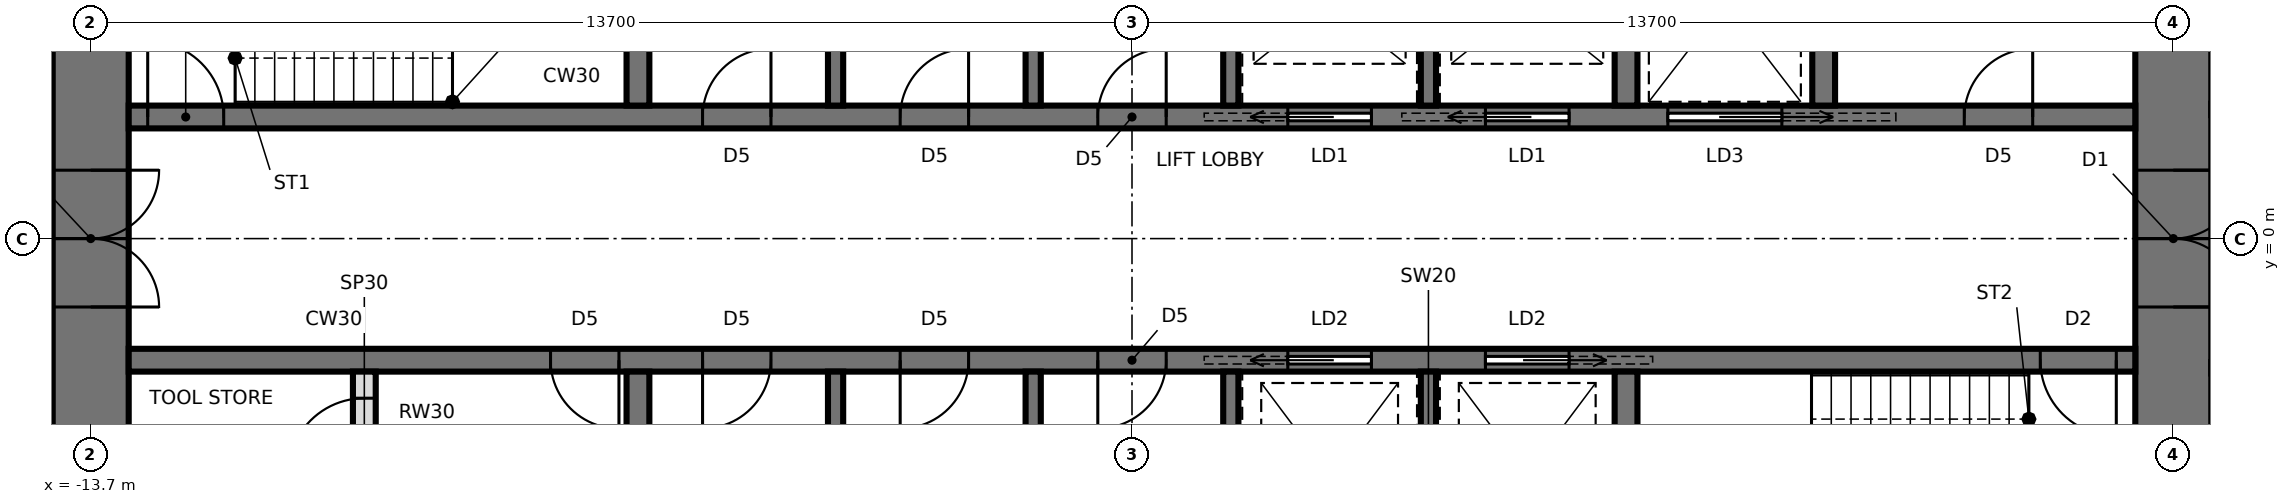
"""IFC4 building model, lengths in metres.
Left out: names, types, materials, properties, quantities, classifications, styles, units other than length and angle.
Written with IfcOpenShell. Run it as: python <this file> out.ifc"""

import sys

from ifc_helpers import new_model, si_unit, direction, frame, frame_2d, origin, place, context, subcontext, project, spatial, rectangle, extrude, element, fill, save


model = new_model("IFC4")
c1 = context("Model", 3, precision=1e-05, world=origin(), true_north=direction((0.0, 1.0)))
c2 = subcontext(c1, "Body", "Model", "MODEL_VIEW")
j1 = project(units=[si_unit("LENGTHUNIT", "METRE"), si_unit("PLANEANGLEUNIT", "RADIAN")], contexts=[c1])
p1 = place(None, origin())
s1 = spatial("IfcSite", under=j1, at=p1, CompositionType="ELEMENT")
p2 = place(p1, origin())
s2 = spatial("IfcBuilding", under=s1, at=p2, CompositionType="ELEMENT")
p3 = place(p2, frame((0.0, 0.0, 272.8)))
s3 = spatial("IfcBuildingStorey", under=s2, at=p3, CompositionType="ELEMENT", Elevation=272.8)
p4 = place(p3, frame((13.7, -9.5, 0.0), z_axis=(0.0, 0.0, 1.0), x_axis=(0.0, 1.0, 0.0)))
e1 = element("IfcWall", 1, at=p4, inside=s3, PredefinedType="SHEAR", context=c2, shape_type="SweptSolid", body=[
    extrude(rectangle(XDim=19.0, YDim=1.0, at=frame_2d((9.5, 0.0))), origin(), (0.0, 0.0, 1.0), 4.2),
])
p5 = place(p4, frame((8.6, 0.0, 0.0)))
e2 = element("IfcOpeningElement", 2, at=p5, cuts=e1, PredefinedType="OPENING", context=c2, shape_type="SweptSolid", body=[
    extrude(rectangle(XDim=1.8, YDim=2.4, at=frame_2d((0.9, 1.2))), frame((0.0, 0.51, 0.0), z_axis=(0.0, -1.0, 0.0), x_axis=(1.0, 0.0, 0.0)), (0.0, 0.0, 1.0), 1.02),
])
p6 = place(p3, frame((-13.7, 9.5, 0.0), z_axis=(0.0, 0.0, 1.0), x_axis=(0.0, -1.0, 0.0)))
e3 = element("IfcWall", 3, at=p6, inside=s3, PredefinedType="SHEAR", context=c2, shape_type="SweptSolid", body=[
    extrude(rectangle(XDim=19.0, YDim=1.0, at=frame_2d((9.5, 0.0))), origin(), (0.0, 0.0, 1.0), 4.2),
])
p7 = place(p6, frame((8.6, 0.0, 0.0)))
e4 = element("IfcOpeningElement", 4, at=p7, cuts=e3, PredefinedType="OPENING", context=c2, shape_type="SweptSolid", body=[
    extrude(rectangle(XDim=1.8, YDim=2.4, at=frame_2d((0.9, 1.2))), frame((0.0, 0.51, 0.0), z_axis=(0.0, -1.0, 0.0), x_axis=(1.0, 0.0, 0.0)), (0.0, 0.0, 1.0), 1.02),
])
p8 = place(p3, frame((-13.2, 1.6, 0.0), z_axis=(0.0, 0.0, 1.0), x_axis=(1.0, 0.0, 0.0)))
e5 = element("IfcWall", 5, at=p8, inside=s3, PredefinedType="SHEAR", context=c2, shape_type="SweptSolid", body=[
    extrude(rectangle(XDim=26.4, YDim=0.3, at=frame_2d((13.2, 0.0))), origin(), (0.0, 0.0, 1.0), 4.2),
])
p9 = place(p8, frame((0.25, 0.0, 0.0)))
e6 = element("IfcOpeningElement", 6, at=p9, cuts=e5, PredefinedType="OPENING", context=c2, shape_type="SweptSolid", body=[
    extrude(rectangle(XDim=1.0, YDim=2.1, at=frame_2d((0.5, 1.05))), frame((0.0, 0.16, 0.0), z_axis=(0.0, -1.0, 0.0), x_axis=(1.0, 0.0, 0.0)), (0.0, 0.0, 1.0), 0.32),
])
p10 = place(p8, frame((20.25, 0.0, 0.0)))
e7 = element("IfcOpeningElement", 7, at=p10, cuts=e5, PredefinedType="OPENING", context=c2, shape_type="SweptSolid", body=[
    extrude(rectangle(XDim=1.5, YDim=2.4, at=frame_2d((0.75, 1.2))), frame((0.0, 0.16, 0.0), z_axis=(0.0, -1.0, 0.0), x_axis=(1.0, 0.0, 0.0)), (0.0, 0.0, 1.0), 0.32),
])
p11 = place(p8, frame((7.55, 0.0, 0.0)))
e8 = element("IfcOpeningElement", 8, at=p11, cuts=e5, PredefinedType="OPENING", context=c2, shape_type="SweptSolid", body=[
    extrude(rectangle(XDim=0.9, YDim=2.1, at=frame_2d((0.45, 1.05))), frame((0.0, 0.16, 0.0), z_axis=(0.0, -1.0, 0.0), x_axis=(1.0, 0.0, 0.0)), (0.0, 0.0, 1.0), 0.32),
])
p12 = place(p8, frame((10.15, 0.0, 0.0)))
e9 = element("IfcOpeningElement", 9, at=p12, cuts=e5, PredefinedType="OPENING", context=c2, shape_type="SweptSolid", body=[
    extrude(rectangle(XDim=0.9, YDim=2.1, at=frame_2d((0.45, 1.05))), frame((0.0, 0.16, 0.0), z_axis=(0.0, -1.0, 0.0), x_axis=(1.0, 0.0, 0.0)), (0.0, 0.0, 1.0), 0.32),
])
p13 = place(p8, frame((12.75, 0.0, 0.0)))
e10 = element("IfcOpeningElement", 10, at=p13, cuts=e5, PredefinedType="OPENING", context=c2, shape_type="SweptSolid", body=[
    extrude(rectangle(XDim=0.9, YDim=2.1, at=frame_2d((0.45, 1.05))), frame((0.0, 0.16, 0.0), z_axis=(0.0, -1.0, 0.0), x_axis=(1.0, 0.0, 0.0)), (0.0, 0.0, 1.0), 0.32),
])
p14 = place(p8, frame((15.25, 0.0, 0.0)))
e11 = element("IfcOpeningElement", 11, at=p14, cuts=e5, PredefinedType="OPENING", context=c2, shape_type="SweptSolid", body=[
    extrude(rectangle(XDim=1.1, YDim=2.3, at=frame_2d((0.55, 1.15))), frame((0.0, 0.16, 0.0), z_axis=(0.0, -1.0, 0.0), x_axis=(1.0, 0.0, 0.0)), (0.0, 0.0, 1.0), 0.32),
])
p15 = place(p8, frame((17.85, 0.0, 0.0)))
e12 = element("IfcOpeningElement", 12, at=p15, cuts=e5, PredefinedType="OPENING", context=c2, shape_type="SweptSolid", body=[
    extrude(rectangle(XDim=1.1, YDim=2.3, at=frame_2d((0.55, 1.15))), frame((0.0, 0.16, 0.0), z_axis=(0.0, -1.0, 0.0), x_axis=(1.0, 0.0, 0.0)), (0.0, 0.0, 1.0), 0.32),
])
p16 = place(p8, frame((24.15, 0.0, 0.0)))
e13 = element("IfcOpeningElement", 13, at=p16, cuts=e5, PredefinedType="OPENING", context=c2, shape_type="SweptSolid", body=[
    extrude(rectangle(XDim=0.9, YDim=2.1, at=frame_2d((0.45, 1.05))), frame((0.0, 0.16, 0.0), z_axis=(0.0, -1.0, 0.0), x_axis=(1.0, 0.0, 0.0)), (0.0, 0.0, 1.0), 0.32),
])
p17 = place(p3, frame((-13.2, -1.6, 0.0), z_axis=(0.0, 0.0, 1.0), x_axis=(1.0, 0.0, 0.0)))
e14 = element("IfcWall", 14, at=p17, inside=s3, PredefinedType="SHEAR", context=c2, shape_type="SweptSolid", body=[
    extrude(rectangle(XDim=26.4, YDim=0.3, at=frame_2d((13.2, 0.0))), origin(), (0.0, 0.0, 1.0), 4.2),
])
p18 = place(p17, frame((25.15, 0.0, 0.0)))
e15 = element("IfcOpeningElement", 15, at=p18, cuts=e14, PredefinedType="OPENING", context=c2, shape_type="SweptSolid", body=[
    extrude(rectangle(XDim=1.0, YDim=2.1, at=frame_2d((0.5, 1.05))), frame((0.0, 0.16, 0.0), z_axis=(0.0, -1.0, 0.0), x_axis=(1.0, 0.0, 0.0)), (0.0, 0.0, 1.0), 0.32),
])
p19 = place(p17, frame((7.55, 0.0, 0.0)))
e16 = element("IfcOpeningElement", 16, at=p19, cuts=e14, PredefinedType="OPENING", context=c2, shape_type="SweptSolid", body=[
    extrude(rectangle(XDim=0.9, YDim=2.1, at=frame_2d((0.45, 1.05))), frame((0.0, 0.16, 0.0), z_axis=(0.0, -1.0, 0.0), x_axis=(1.0, 0.0, 0.0)), (0.0, 0.0, 1.0), 0.32),
])
p20 = place(p17, frame((10.15, 0.0, 0.0)))
e17 = element("IfcOpeningElement", 17, at=p20, cuts=e14, PredefinedType="OPENING", context=c2, shape_type="SweptSolid", body=[
    extrude(rectangle(XDim=0.9, YDim=2.1, at=frame_2d((0.45, 1.05))), frame((0.0, 0.16, 0.0), z_axis=(0.0, -1.0, 0.0), x_axis=(1.0, 0.0, 0.0)), (0.0, 0.0, 1.0), 0.32),
])
p21 = place(p17, frame((12.75, 0.0, 0.0)))
e18 = element("IfcOpeningElement", 18, at=p21, cuts=e14, PredefinedType="OPENING", context=c2, shape_type="SweptSolid", body=[
    extrude(rectangle(XDim=0.9, YDim=2.1, at=frame_2d((0.45, 1.05))), frame((0.0, 0.16, 0.0), z_axis=(0.0, -1.0, 0.0), x_axis=(1.0, 0.0, 0.0)), (0.0, 0.0, 1.0), 0.32),
])
p22 = place(p17, frame((15.25, 0.0, 0.0)))
e19 = element("IfcOpeningElement", 19, at=p22, cuts=e14, PredefinedType="OPENING", context=c2, shape_type="SweptSolid", body=[
    extrude(rectangle(XDim=1.1, YDim=2.3, at=frame_2d((0.55, 1.15))), frame((0.0, 0.16, 0.0), z_axis=(0.0, -1.0, 0.0), x_axis=(1.0, 0.0, 0.0)), (0.0, 0.0, 1.0), 0.32),
])
p23 = place(p17, frame((17.85, 0.0, 0.0)))
e20 = element("IfcOpeningElement", 20, at=p23, cuts=e14, PredefinedType="OPENING", context=c2, shape_type="SweptSolid", body=[
    extrude(rectangle(XDim=1.1, YDim=2.3, at=frame_2d((0.55, 1.15))), frame((0.0, 0.16, 0.0), z_axis=(0.0, -1.0, 0.0), x_axis=(1.0, 0.0, 0.0)), (0.0, 0.0, 1.0), 0.32),
])
p24 = place(p17, frame((5.55, 0.0, 0.0)))
e21 = element("IfcOpeningElement", 21, at=p24, cuts=e14, PredefinedType="OPENING", context=c2, shape_type="SweptSolid", body=[
    extrude(rectangle(XDim=0.9, YDim=2.1, at=frame_2d((0.45, 1.05))), frame((0.0, 0.16, 0.0), z_axis=(0.0, -1.0, 0.0), x_axis=(1.0, 0.0, 0.0)), (0.0, 0.0, 1.0), 0.32),
])
for number, where, z_axis, x_axis in (
    (22, (-6.5, 1.75, 0.0), (0.0, 0.0, 1.0), (0.0, 1.0, 0.0)),
    (23, (6.5, 1.75, 0.0), (0.0, 0.0, 1.0), (0.0, 1.0, 0.0)),
):
    element("IfcWall", number, at=place(p3, frame(where, z_axis=z_axis, x_axis=x_axis)), inside=s3, PredefinedType="SHEAR", context=c2, shape_type="SweptSolid", body=[
        extrude(rectangle(XDim=2.7, YDim=0.3, at=frame_2d((1.35, 0.0))), origin(), (0.0, 0.0, 1.0), 4.2),
    ])
for number, where, z_axis, x_axis in (
    (24, (-3.9, 1.75, 0.0), (0.0, 0.0, 1.0), (0.0, 1.0, 0.0)),
    (25, (-1.3, 1.75, 0.0), (0.0, 0.0, 1.0), (0.0, 1.0, 0.0)),
    (26, (1.3, 1.75, 0.0), (0.0, 0.0, 1.0), (0.0, 1.0, 0.0)),
    (27, (3.9, 1.75, 0.0), (0.0, 0.0, 1.0), (0.0, 1.0, 0.0)),
):
    element("IfcWall", number, at=place(p3, frame(where, z_axis=z_axis, x_axis=x_axis)), inside=s3, PredefinedType="SHEAR", context=c2, shape_type="SweptSolid", body=[
        extrude(rectangle(XDim=2.7, YDim=0.2, at=frame_2d((1.35, 0.0))), origin(), (0.0, 0.0, 1.0), 4.2),
    ])
for number, where, z_axis, x_axis in (
    (28, (-6.5, -1.75, 0.0), (0.0, 0.0, 1.0), (0.0, -1.0, 0.0)),
    (29, (6.5, -1.75, 0.0), (0.0, 0.0, 1.0), (0.0, -1.0, 0.0)),
):
    element("IfcWall", number, at=place(p3, frame(where, z_axis=z_axis, x_axis=x_axis)), inside=s3, PredefinedType="SHEAR", context=c2, shape_type="SweptSolid", body=[
        extrude(rectangle(XDim=2.7, YDim=0.3, at=frame_2d((1.35, 0.0))), origin(), (0.0, 0.0, 1.0), 4.2),
    ])
for number, where, z_axis, x_axis in (
    (30, (-3.9, -1.75, 0.0), (0.0, 0.0, 1.0), (0.0, -1.0, 0.0)),
    (31, (-1.3, -1.75, 0.0), (0.0, 0.0, 1.0), (0.0, -1.0, 0.0)),
    (32, (1.3, -1.75, 0.0), (0.0, 0.0, 1.0), (0.0, -1.0, 0.0)),
    (33, (3.9, -1.75, 0.0), (0.0, 0.0, 1.0), (0.0, -1.0, 0.0)),
):
    element("IfcWall", number, at=place(p3, frame(where, z_axis=z_axis, x_axis=x_axis)), inside=s3, PredefinedType="SHEAR", context=c2, shape_type="SweptSolid", body=[
        extrude(rectangle(XDim=2.7, YDim=0.2, at=frame_2d((1.35, 0.0))), origin(), (0.0, 0.0, 1.0), 4.2),
    ])
p25 = place(p3, frame((9.1, 1.75, 0.0), z_axis=(0.0, 0.0, 1.0), x_axis=(0.0, 1.0, 0.0)))
e34 = element("IfcWall", 34, at=p25, inside=s3, PredefinedType="SHEAR", context=c2, shape_type="SweptSolid", body=[
    extrude(rectangle(XDim=2.7, YDim=0.3, at=frame_2d((1.35, 0.0))), origin(), (0.0, 0.0, 1.0), 4.2),
])
p26 = place(p3, frame((-10.1, -3.25, 0.0), z_axis=(0.0, 0.0, 1.0), x_axis=(0.0, 1.0, 0.0)))
e35 = element("IfcWall", 35, at=p26, inside=s3, PredefinedType="PARTITIONING", context=c2, shape_type="SweptSolid", body=[
    extrude(rectangle(XDim=1.5, YDim=0.3, at=frame_2d((0.75, 0.0))), origin(), (0.0, 0.0, 1.0), 4.0),
])
p27 = place(p26, frame((0.15, 0.0, 0.0)))
e36 = element("IfcOpeningElement", 36, at=p27, cuts=e35, PredefinedType="OPENING", context=c2, shape_type="SweptSolid", body=[
    extrude(rectangle(XDim=1.0, YDim=2.4, at=frame_2d((0.5, 1.2))), frame((0.0, 0.16, 0.0), z_axis=(0.0, -1.0, 0.0), x_axis=(1.0, 0.0, 0.0)), (0.0, 0.0, 1.0), 0.32),
])
p28 = place(p3, frame((14.2, -1.7, 0.0), z_axis=(0.0, 0.0, 1.0), x_axis=(1.0, 0.0, 0.0)))
e37 = element("IfcWall", 37, at=p28, inside=s3, PredefinedType="PARTITIONING", context=c2, shape_type="SweptSolid", body=[
    extrude(rectangle(XDim=4.8, YDim=0.15, at=frame_2d((2.4, 0.0))), origin(), (0.0, 0.0, 1.0), 4.0),
])
p29 = place(p7, origin())
e38 = element("IfcDoor", 38, at=p29, inside=s3, OperationType="DOUBLE_DOOR_SINGLE_SWING", PredefinedType="DOOR", context=c2, shape_type="SweptSolid", body=[
    extrude(rectangle(XDim=1.72, YDim=2.36, at=frame_2d((0.9, 1.18))), frame((0.0, 0.025, 0.0), z_axis=(0.0, -1.0, 0.0), x_axis=(1.0, 0.0, 0.0)), (0.0, 0.0, 1.0), 0.05),
    extrude(rectangle(XDim=0.04, YDim=2.4, at=frame_2d((0.02, 1.2))), frame((0.0, 0.25, 0.0), z_axis=(0.0, -1.0, 0.0), x_axis=(1.0, 0.0, 0.0)), (0.0, 0.0, 1.0), 0.5),
    extrude(rectangle(XDim=0.04, YDim=2.4, at=frame_2d((1.78, 1.2))), frame((0.0, 0.25, 0.0), z_axis=(0.0, -1.0, 0.0), x_axis=(1.0, 0.0, 0.0)), (0.0, 0.0, 1.0), 0.5),
    extrude(rectangle(XDim=1.72, YDim=0.04, at=frame_2d((0.9, 2.38))), frame((0.0, 0.25, 0.0), z_axis=(0.0, -1.0, 0.0), x_axis=(1.0, 0.0, 0.0)), (0.0, 0.0, 1.0), 0.5),
])
fill(e4, e38)
p30 = place(p5, frame((1.8, 0.0, 0.0), z_axis=(0.0, 0.0, 1.0), x_axis=(-1.0, 0.0, 0.0)))
e39 = element("IfcDoor", 39, at=p30, inside=s3, OperationType="DOUBLE_DOOR_SINGLE_SWING", PredefinedType="DOOR", context=c2, shape_type="SweptSolid", body=[
    extrude(rectangle(XDim=1.72, YDim=2.36, at=frame_2d((0.9, 1.18))), frame((0.0, 0.025, 0.0), z_axis=(0.0, -1.0, 0.0), x_axis=(1.0, 0.0, 0.0)), (0.0, 0.0, 1.0), 0.05),
    extrude(rectangle(XDim=0.04, YDim=2.4, at=frame_2d((1.78, 1.2))), frame((0.0, 0.25, 0.0), z_axis=(0.0, -1.0, 0.0), x_axis=(1.0, 0.0, 0.0)), (0.0, 0.0, 1.0), 0.5),
    extrude(rectangle(XDim=0.04, YDim=2.4, at=frame_2d((0.02, 1.2))), frame((0.0, 0.25, 0.0), z_axis=(0.0, -1.0, 0.0), x_axis=(1.0, 0.0, 0.0)), (0.0, 0.0, 1.0), 0.5),
    extrude(rectangle(XDim=1.72, YDim=0.04, at=frame_2d((0.9, 2.38))), frame((0.0, 0.25, 0.0), z_axis=(0.0, -1.0, 0.0), x_axis=(1.0, 0.0, 0.0)), (0.0, 0.0, 1.0), 0.5),
])
fill(e2, e39)
p31 = place(p9, origin())
e40 = element("IfcDoor", 40, at=p31, inside=s3, OperationType="SINGLE_SWING_LEFT", PredefinedType="DOOR", context=c2, shape_type="SweptSolid", body=[
    extrude(rectangle(XDim=1.0, YDim=2.1, at=frame_2d((0.5, 1.05))), frame((0.0, 0.025, 0.0), z_axis=(0.0, -1.0, 0.0), x_axis=(1.0, 0.0, 0.0)), (0.0, 0.0, 1.0), 0.05),
])
fill(e6, e40)
p32 = place(p18, frame((1.0, 0.0, 0.0), z_axis=(0.0, 0.0, 1.0), x_axis=(-1.0, 0.0, 0.0)))
e41 = element("IfcDoor", 41, at=p32, inside=s3, OperationType="SINGLE_SWING_LEFT", PredefinedType="DOOR", context=c2, shape_type="SweptSolid", body=[
    extrude(rectangle(XDim=1.0, YDim=2.1, at=frame_2d((0.5, 1.05))), frame((0.0, 0.025, 0.0), z_axis=(0.0, -1.0, 0.0), x_axis=(1.0, 0.0, 0.0)), (0.0, 0.0, 1.0), 0.05),
])
fill(e15, e41)
p33 = place(p10, origin())
e42 = element("IfcDoor", 42, at=p33, inside=s3, OperationType="SLIDING_TO_RIGHT", PredefinedType="DOOR", context=c2, shape_type="SweptSolid", body=[
    extrude(rectangle(XDim=1.5, YDim=2.4, at=frame_2d((0.75, 1.2))), frame((0.0, 0.025, 0.0), z_axis=(0.0, -1.0, 0.0), x_axis=(1.0, 0.0, 0.0)), (0.0, 0.0, 1.0), 0.05),
])
fill(e7, e42)
p34 = place(p11, origin())
e43 = element("IfcDoor", 43, at=p34, inside=s3, OperationType="SINGLE_SWING_RIGHT", PredefinedType="DOOR", context=c2, shape_type="SweptSolid", body=[
    extrude(rectangle(XDim=0.9, YDim=2.1, at=frame_2d((0.45, 1.05))), frame((0.0, 0.025, 0.0), z_axis=(0.0, -1.0, 0.0), x_axis=(1.0, 0.0, 0.0)), (0.0, 0.0, 1.0), 0.05),
])
fill(e8, e43)
p35 = place(p12, origin())
e44 = element("IfcDoor", 44, at=p35, inside=s3, OperationType="SINGLE_SWING_RIGHT", PredefinedType="DOOR", context=c2, shape_type="SweptSolid", body=[
    extrude(rectangle(XDim=0.9, YDim=2.1, at=frame_2d((0.45, 1.05))), frame((0.0, 0.025, 0.0), z_axis=(0.0, -1.0, 0.0), x_axis=(1.0, 0.0, 0.0)), (0.0, 0.0, 1.0), 0.05),
])
fill(e9, e44)
p36 = place(p13, origin())
e45 = element("IfcDoor", 45, at=p36, inside=s3, OperationType="SINGLE_SWING_RIGHT", PredefinedType="DOOR", context=c2, shape_type="SweptSolid", body=[
    extrude(rectangle(XDim=0.9, YDim=2.1, at=frame_2d((0.45, 1.05))), frame((0.0, 0.025, 0.0), z_axis=(0.0, -1.0, 0.0), x_axis=(1.0, 0.0, 0.0)), (0.0, 0.0, 1.0), 0.05),
])
fill(e10, e45)
p37 = place(p14, origin())
e46 = element("IfcDoor", 46, at=p37, inside=s3, OperationType="SLIDING_TO_LEFT", PredefinedType="DOOR", context=c2, shape_type="SweptSolid", body=[
    extrude(rectangle(XDim=1.1, YDim=2.3, at=frame_2d((0.55, 1.15))), frame((0.0, 0.025, 0.0), z_axis=(0.0, -1.0, 0.0), x_axis=(1.0, 0.0, 0.0)), (0.0, 0.0, 1.0), 0.05),
])
fill(e11, e46)
p38 = place(p15, origin())
e47 = element("IfcDoor", 47, at=p38, inside=s3, OperationType="SLIDING_TO_LEFT", PredefinedType="DOOR", context=c2, shape_type="SweptSolid", body=[
    extrude(rectangle(XDim=1.1, YDim=2.3, at=frame_2d((0.55, 1.15))), frame((0.0, 0.025, 0.0), z_axis=(0.0, -1.0, 0.0), x_axis=(1.0, 0.0, 0.0)), (0.0, 0.0, 1.0), 0.05),
])
fill(e12, e47)
p39 = place(p19, frame((0.9, 0.0, 0.0), z_axis=(0.0, 0.0, 1.0), x_axis=(-1.0, 0.0, 0.0)))
e48 = element("IfcDoor", 48, at=p39, inside=s3, OperationType="SINGLE_SWING_RIGHT", PredefinedType="DOOR", context=c2, shape_type="SweptSolid", body=[
    extrude(rectangle(XDim=0.9, YDim=2.1, at=frame_2d((0.45, 1.05))), frame((0.0, 0.025, 0.0), z_axis=(0.0, -1.0, 0.0), x_axis=(1.0, 0.0, 0.0)), (0.0, 0.0, 1.0), 0.05),
])
fill(e16, e48)
p40 = place(p20, frame((0.9, 0.0, 0.0), z_axis=(0.0, 0.0, 1.0), x_axis=(-1.0, 0.0, 0.0)))
e49 = element("IfcDoor", 49, at=p40, inside=s3, OperationType="SINGLE_SWING_RIGHT", PredefinedType="DOOR", context=c2, shape_type="SweptSolid", body=[
    extrude(rectangle(XDim=0.9, YDim=2.1, at=frame_2d((0.45, 1.05))), frame((0.0, 0.025, 0.0), z_axis=(0.0, -1.0, 0.0), x_axis=(1.0, 0.0, 0.0)), (0.0, 0.0, 1.0), 0.05),
])
fill(e17, e49)
p41 = place(p21, frame((0.9, 0.0, 0.0), z_axis=(0.0, 0.0, 1.0), x_axis=(-1.0, 0.0, 0.0)))
e50 = element("IfcDoor", 50, at=p41, inside=s3, OperationType="SINGLE_SWING_RIGHT", PredefinedType="DOOR", context=c2, shape_type="SweptSolid", body=[
    extrude(rectangle(XDim=0.9, YDim=2.1, at=frame_2d((0.45, 1.05))), frame((0.0, 0.025, 0.0), z_axis=(0.0, -1.0, 0.0), x_axis=(1.0, 0.0, 0.0)), (0.0, 0.0, 1.0), 0.05),
])
fill(e18, e50)
p42 = place(p22, frame((1.1, 0.0, 0.0), z_axis=(0.0, 0.0, 1.0), x_axis=(-1.0, 0.0, 0.0)))
e51 = element("IfcDoor", 51, at=p42, inside=s3, OperationType="SLIDING_TO_RIGHT", PredefinedType="DOOR", context=c2, shape_type="SweptSolid", body=[
    extrude(rectangle(XDim=1.1, YDim=2.3, at=frame_2d((0.55, 1.15))), frame((0.0, 0.025, 0.0), z_axis=(0.0, -1.0, 0.0), x_axis=(1.0, 0.0, 0.0)), (0.0, 0.0, 1.0), 0.05),
])
fill(e19, e51)
p43 = place(p23, frame((1.1, 0.0, 0.0), z_axis=(0.0, 0.0, 1.0), x_axis=(-1.0, 0.0, 0.0)))
e52 = element("IfcDoor", 52, at=p43, inside=s3, OperationType="SLIDING_TO_LEFT", PredefinedType="DOOR", context=c2, shape_type="SweptSolid", body=[
    extrude(rectangle(XDim=1.1, YDim=2.3, at=frame_2d((0.55, 1.15))), frame((0.0, 0.025, 0.0), z_axis=(0.0, -1.0, 0.0), x_axis=(1.0, 0.0, 0.0)), (0.0, 0.0, 1.0), 0.05),
])
fill(e20, e52)
p44 = place(p16, origin())
e53 = element("IfcDoor", 53, at=p44, inside=s3, OperationType="SINGLE_SWING_RIGHT", PredefinedType="DOOR", context=c2, shape_type="SweptSolid", body=[
    extrude(rectangle(XDim=0.9, YDim=2.1, at=frame_2d((0.45, 1.05))), frame((0.0, 0.025, 0.0), z_axis=(0.0, -1.0, 0.0), x_axis=(1.0, 0.0, 0.0)), (0.0, 0.0, 1.0), 0.05),
])
fill(e13, e53)
p45 = place(p24, frame((0.9, 0.0, 0.0), z_axis=(0.0, 0.0, 1.0), x_axis=(-1.0, 0.0, 0.0)))
e54 = element("IfcDoor", 54, at=p45, inside=s3, OperationType="SINGLE_SWING_LEFT", PredefinedType="DOOR", context=c2, shape_type="SweptSolid", body=[
    extrude(rectangle(XDim=0.9, YDim=2.1, at=frame_2d((0.45, 1.05))), frame((0.0, 0.025, 0.0), z_axis=(0.0, -1.0, 0.0), x_axis=(1.0, 0.0, 0.0)), (0.0, 0.0, 1.0), 0.05),
])
fill(e21, e54)
p46 = place(p27, origin())
e55 = element("IfcDoor", 55, at=p46, inside=s3, OperationType="SINGLE_SWING_LEFT", PredefinedType="DOOR", context=c2, shape_type="SweptSolid", body=[
    extrude(rectangle(XDim=1.0, YDim=2.4, at=frame_2d((0.5, 1.2))), frame((0.0, 0.025, 0.0), z_axis=(0.0, -1.0, 0.0), x_axis=(1.0, 0.0, 0.0)), (0.0, 0.0, 1.0), 0.05),
])
fill(e36, e55)
save(model, sys.argv[1])
